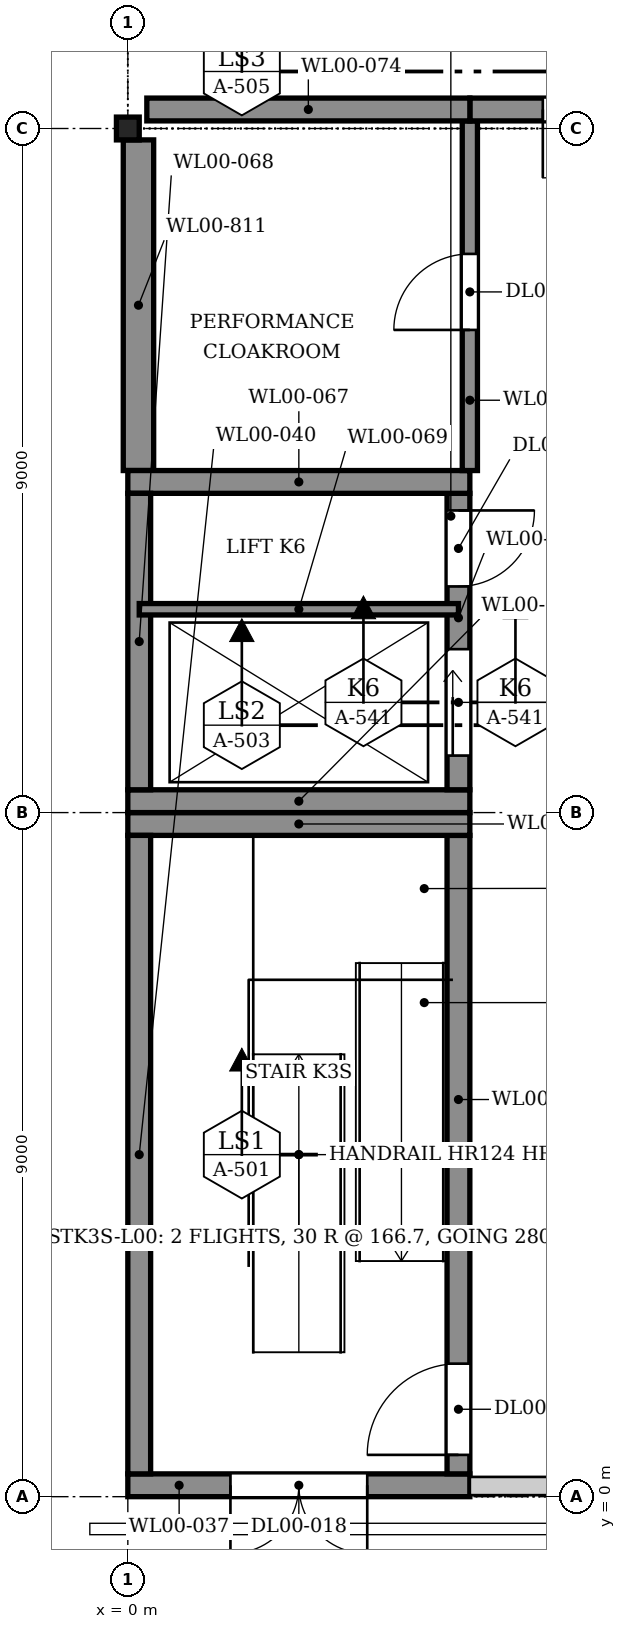
"""IFC4 building model, lengths in metres.
Left out: names, types, materials, properties, quantities, classifications, styles, units other than length and angle.
Written with IfcOpenShell. Run it as: python <this file> out.ifc"""

import sys

from ifc_helpers import new_model, si_unit, direction, frame, frame_2d, origin, origin_2d, place, context, subcontext, project, spatial, polyline, rectangle, hollow_rectangle, outline, extrude, element, fill, save


model = new_model("IFC4")
c1 = context("Model", 3, precision=1e-05, world=origin(), true_north=direction((0.0, 1.0)))
c2 = subcontext(c1, "Body", "Model", "MODEL_VIEW")
j1 = project(units=[si_unit("LENGTHUNIT", "METRE"), si_unit("PLANEANGLEUNIT", "RADIAN")], contexts=[c1])
p1 = place(None, origin())
s1 = spatial("IfcSite", under=j1, at=p1, CompositionType="ELEMENT")
p2 = place(p1, origin())
s2 = spatial("IfcBuilding", under=s1, at=p2, CompositionType="ELEMENT")
p3 = place(p2, origin())
s3 = spatial("IfcBuildingStorey", under=s2, at=p3, CompositionType="ELEMENT", Elevation=0.0)
p4 = place(p3, frame((0.0, 18.0, 0.0), z_axis=(0.0, 0.0, 1.0), x_axis=(1.0, 0.0, 0.0)))
e1 = element("IfcColumn", 1, at=p4, inside=s3, PredefinedType="COLUMN", context=c2, shape_type="SweptSolid", body=[
    extrude(hollow_rectangle(XDim=0.3, YDim=0.3, WallThickness=0.016, InnerFilletRadius=0.024, OuterFilletRadius=0.04, at=origin_2d()), origin(), (0.0, 0.0, 1.0), 5.0),
])
p5 = place(p3, frame((0.14, 18.15, 0.0), z_axis=(0.0, 0.0, 1.0), x_axis=(0.0, 1.0, 0.0)))
e2 = element("IfcWall", 2, at=p5, inside=s3, PredefinedType="SOLIDWALL", context=c2, shape_type="SweptSolid", body=[
    extrude(outline(polyline([(0.0, 0.0), (8.85, 0.0), (8.85, 15.44), (0.0, 14.732), (0.0, 0.0)])), frame((0.0, 0.2, 0.0), z_axis=(0.0, -1.0, 0.0), x_axis=(1.0, 0.0, 0.0)), (0.0, 0.0, 1.0), 0.4),
])
p6 = place(p3, frame((0.14, 13.5, 0.0), z_axis=(0.0, 0.0, 1.0), x_axis=(0.0, 1.0, 0.0)))
e3 = element("IfcWall", 3, at=p6, inside=s3, PredefinedType="SOLIDWALL", context=c2, shape_type="SweptSolid", body=[
    extrude(rectangle(XDim=4.35, YDim=0.4, at=frame_2d((2.175, 0.0))), origin(), (0.0, 0.0, 1.0), 4.835),
])
p7 = place(p3, frame((0.0, 0.15, 0.0), z_axis=(0.0, 0.0, 1.0), x_axis=(1.0, 0.0, 0.0)))
e4 = element("IfcWall", 4, at=p7, inside=s3, PredefinedType="SOLIDWALL", context=c2, shape_type="SweptSolid", body=[
    extrude(rectangle(XDim=4.5, YDim=0.3, at=frame_2d((2.25, 0.0))), origin(), (0.0, 0.0, 1.0), 5.0),
])
p8 = place(p7, frame((1.35, 0.0, 0.0)))
e5 = element("IfcOpeningElement", 5, at=p8, cuts=e4, PredefinedType="OPENING", context=c2, shape_type="SweptSolid", body=[
    extrude(rectangle(XDim=1.8, YDim=2.1, at=frame_2d((0.9, 1.05))), frame((0.0, 0.16, 0.0), z_axis=(0.0, -1.0, 0.0), x_axis=(1.0, 0.0, 0.0)), (0.0, 0.0, 1.0), 0.32),
])
p9 = place(p3, frame((4.35, 0.3, 0.0), z_axis=(0.0, 0.0, 1.0), x_axis=(0.0, 1.0, 0.0)))
e6 = element("IfcWall", 6, at=p9, inside=s3, PredefinedType="SOLIDWALL", context=c2, shape_type="SweptSolid", body=[
    extrude(rectangle(XDim=8.4, YDim=0.3, at=frame_2d((4.2, 0.0))), origin(), (0.0, 0.0, 1.0), 5.0),
])
p10 = place(p9, frame((0.25, 0.0, 0.0)))
e7 = element("IfcOpeningElement", 7, at=p10, cuts=e6, PredefinedType="OPENING", context=c2, shape_type="SweptSolid", body=[
    extrude(rectangle(XDim=1.2, YDim=2.1, at=frame_2d((0.6, 1.05))), frame((0.0, 0.16, 0.0), z_axis=(0.0, -1.0, 0.0), x_axis=(1.0, 0.0, 0.0)), (0.0, 0.0, 1.0), 0.32),
])
p11 = place(p3, frame((0.0, 8.85, 0.0), z_axis=(0.0, 0.0, 1.0), x_axis=(1.0, 0.0, 0.0)))
e8 = element("IfcWall", 8, at=p11, inside=s3, PredefinedType="SOLIDWALL", context=c2, shape_type="SweptSolid", body=[
    extrude(rectangle(XDim=4.5, YDim=0.3, at=frame_2d((2.25, 0.0))), origin(), (0.0, 0.0, 1.0), 5.0),
])
p12 = place(p3, frame((0.15, 0.3, 0.0), z_axis=(0.0, 0.0, 1.0), x_axis=(0.0, 1.0, 0.0)))
e9 = element("IfcWall", 9, at=p12, inside=s3, PredefinedType="SOLIDWALL", context=c2, shape_type="SweptSolid", body=[
    extrude(rectangle(XDim=8.4, YDim=0.3, at=frame_2d((4.2, 0.0))), origin(), (0.0, 0.0, 1.0), 5.0),
])
p13 = place(p3, frame((0.0, 9.15, 0.0), z_axis=(0.0, 0.0, 1.0), x_axis=(1.0, 0.0, 0.0)))
e10 = element("IfcWall", 10, at=p13, inside=s3, PredefinedType="SOLIDWALL", context=c2, shape_type="SweptSolid", body=[
    extrude(rectangle(XDim=4.5, YDim=0.3, at=frame_2d((2.25, 0.0))), origin(), (0.0, 0.0, 1.0), 5.0),
])
p14 = place(p3, frame((4.35, 9.3, 0.0), z_axis=(0.0, 0.0, 1.0), x_axis=(0.0, 1.0, 0.0)))
e11 = element("IfcWall", 11, at=p14, inside=s3, PredefinedType="SOLIDWALL", context=c2, shape_type="SweptSolid", body=[
    extrude(rectangle(XDim=3.9, YDim=0.3, at=frame_2d((1.95, 0.0))), origin(), (0.0, 0.0, 1.0), 5.0),
])
p15 = place(p14, frame((0.45, 0.0, 0.0)))
e12 = element("IfcOpeningElement", 12, at=p15, cuts=e11, PredefinedType="OPENING", context=c2, shape_type="SweptSolid", body=[
    extrude(rectangle(XDim=1.4, YDim=2.1, at=frame_2d((0.7, 1.05))), frame((0.0, 0.16, 0.0), z_axis=(0.0, -1.0, 0.0), x_axis=(1.0, 0.0, 0.0)), (0.0, 0.0, 1.0), 0.32),
])
p16 = place(p14, frame((2.675, 0.0, 0.0)))
e13 = element("IfcOpeningElement", 13, at=p16, cuts=e11, PredefinedType="OPENING", context=c2, shape_type="SweptSolid", body=[
    extrude(rectangle(XDim=1.0, YDim=2.1, at=frame_2d((0.5, 1.05))), frame((0.0, 0.16, 0.0), z_axis=(0.0, -1.0, 0.0), x_axis=(1.0, 0.0, 0.0)), (0.0, 0.0, 1.0), 0.32),
])
p17 = place(p3, frame((0.0, 13.35, 0.0), z_axis=(0.0, 0.0, 1.0), x_axis=(1.0, 0.0, 0.0)))
e14 = element("IfcWall", 14, at=p17, inside=s3, PredefinedType="SOLIDWALL", context=c2, shape_type="SweptSolid", body=[
    extrude(rectangle(XDim=4.5, YDim=0.3, at=frame_2d((2.25, 0.0))), origin(), (0.0, 0.0, 1.0), 5.0),
])
p18 = place(p3, frame((0.15, 9.3, 0.0), z_axis=(0.0, 0.0, 1.0), x_axis=(0.0, 1.0, 0.0)))
e15 = element("IfcWall", 15, at=p18, inside=s3, PredefinedType="SOLIDWALL", context=c2, shape_type="SweptSolid", body=[
    extrude(rectangle(XDim=3.9, YDim=0.3, at=frame_2d((1.95, 0.0))), origin(), (0.0, 0.0, 1.0), 5.0),
])
p19 = place(p3, frame((0.15, 11.675, 0.0), z_axis=(0.0, 0.0, 1.0), x_axis=(1.0, 0.0, 0.0)))
e16 = element("IfcWall", 16, at=p19, inside=s3, PredefinedType="SOLIDWALL", context=c2, shape_type="SweptSolid", body=[
    extrude(rectangle(XDim=4.2, YDim=0.15, at=frame_2d((2.1, 0.0))), origin(), (0.0, 0.0, 1.0), 5.0),
])
p20 = place(p3, frame((4.5, 13.5, 0.0), z_axis=(0.0, 0.0, 1.0), x_axis=(0.0, 1.0, 0.0)))
e17 = element("IfcWall", 17, at=p20, inside=s3, PredefinedType="PARTITIONING", context=c2, shape_type="SweptSolid", body=[
    extrude(rectangle(XDim=4.6, YDim=0.2, at=frame_2d((2.3, 0.0))), origin(), (0.0, 0.0, 1.0), 3.825),
])
p21 = place(p20, frame((1.85, 0.0, 0.0)))
e18 = element("IfcOpeningElement", 18, at=p21, cuts=e17, PredefinedType="OPENING", context=c2, shape_type="SweptSolid", body=[
    extrude(rectangle(XDim=1.0, YDim=2.1, at=frame_2d((0.5, 1.05))), frame((0.0, 0.11, 0.0), z_axis=(0.0, -1.0, 0.0), x_axis=(1.0, 0.0, 0.0)), (0.0, 0.0, 1.0), 0.22),
])
p22 = place(p3, frame((4.5, 18.25, -0.038), z_axis=(0.0, 0.0, 1.0), x_axis=(1.0, 0.0, 0.0)))
e19 = element("IfcWall", 19, at=p22, inside=s3, PredefinedType="PARTITIONING", context=c2, shape_type="SweptSolid", body=[
    extrude(rectangle(XDim=7.5, YDim=0.3, at=frame_2d((3.75, 0.0))), origin(), (0.0, 0.0, 1.0), 12.428),
])
p23 = place(p22, frame((0.96, 0.0, 0.0)))
e20 = element("IfcOpeningElement", 20, at=p23, cuts=e19, PredefinedType="OPENING", context=c2, shape_type="SweptSolid", body=[
    extrude(rectangle(XDim=1.8, YDim=2.1, at=frame_2d((0.9, 1.05))), frame((0.0, 0.16, 0.0), z_axis=(0.0, -1.0, 0.0), x_axis=(1.0, 0.0, 0.0)), (0.0, 0.0, 1.0), 0.32),
])
p24 = place(p22, frame((4.76, 0.0, 0.0)))
e21 = element("IfcOpeningElement", 21, at=p24, cuts=e19, PredefinedType="OPENING", context=c2, shape_type="SweptSolid", body=[
    extrude(rectangle(XDim=1.8, YDim=2.1, at=frame_2d((0.9, 1.05))), frame((0.0, 0.16, 0.0), z_axis=(0.0, -1.0, 0.0), x_axis=(1.0, 0.0, 0.0)), (0.0, 0.0, 1.0), 0.32),
])
p25 = place(p3, frame((0.25, 18.25, -0.038), z_axis=(0.0, 0.0, 1.0), x_axis=(1.0, 0.0, 0.0)))
e22 = element("IfcWall", 22, at=p25, inside=s3, PredefinedType="PARTITIONING", context=c2, shape_type="SweptSolid", body=[
    extrude(rectangle(XDim=4.25, YDim=0.3, at=frame_2d((2.125, 0.0))), origin(), (0.0, 0.0, 1.0), 12.428),
])
p26 = place(p8, frame((1.8, 0.0, 0.0), z_axis=(0.0, 0.0, 1.0), x_axis=(-1.0, 0.0, 0.0)))
e23 = element("IfcDoor", 23, at=p26, inside=s3, OperationType="DOUBLE_DOOR_SINGLE_SWING", PredefinedType="DOOR", context=c2, shape_type="SweptSolid", body=[
    extrude(rectangle(XDim=1.8, YDim=2.1, at=frame_2d((0.9, 1.05))), frame((0.0, 0.025, 0.0), z_axis=(0.0, -1.0, 0.0), x_axis=(1.0, 0.0, 0.0)), (0.0, 0.0, 1.0), 0.05),
])
fill(e5, e23)
p27 = place(p10, origin())
e24 = element("IfcDoor", 24, at=p27, inside=s3, OperationType="SINGLE_SWING_RIGHT", PredefinedType="DOOR", context=c2, shape_type="SweptSolid", body=[
    extrude(rectangle(XDim=1.2, YDim=2.1, at=frame_2d((0.6, 1.05))), frame((0.0, 0.025, 0.0), z_axis=(0.0, -1.0, 0.0), x_axis=(1.0, 0.0, 0.0)), (0.0, 0.0, 1.0), 0.05),
])
fill(e7, e24)
p28 = place(p15, origin())
e25 = element("IfcDoor", 25, at=p28, inside=s3, OperationType="SLIDING_TO_LEFT", PredefinedType="DOOR", context=c2, shape_type="SweptSolid", body=[
    extrude(rectangle(XDim=1.4, YDim=2.1, at=frame_2d((0.7, 1.05))), frame((0.0, 0.025, 0.0), z_axis=(0.0, -1.0, 0.0), x_axis=(1.0, 0.0, 0.0)), (0.0, 0.0, 1.0), 0.05),
])
fill(e12, e25)
p29 = place(p16, frame((1.0, 0.0, 0.0), z_axis=(0.0, 0.0, 1.0), x_axis=(-1.0, 0.0, 0.0)))
e26 = element("IfcDoor", 26, at=p29, inside=s3, OperationType="SINGLE_SWING_RIGHT", PredefinedType="DOOR", context=c2, shape_type="SweptSolid", body=[
    extrude(rectangle(XDim=1.0, YDim=2.1, at=frame_2d((0.5, 1.05))), frame((0.0, 0.025, 0.0), z_axis=(0.0, -1.0, 0.0), x_axis=(1.0, 0.0, 0.0)), (0.0, 0.0, 1.0), 0.05),
])
fill(e13, e26)
p30 = place(p23, frame((1.8, 0.0, 0.0), z_axis=(0.0, 0.0, 1.0), x_axis=(-1.0, 0.0, 0.0)))
e27 = element("IfcDoor", 27, at=p30, inside=s3, OperationType="DOUBLE_DOOR_SINGLE_SWING", PredefinedType="DOOR", context=c2, shape_type="SweptSolid", body=[
    extrude(rectangle(XDim=1.8, YDim=2.1, at=frame_2d((0.9, 1.05))), frame((0.0, 0.025, 0.0), z_axis=(0.0, -1.0, 0.0), x_axis=(1.0, 0.0, 0.0)), (0.0, 0.0, 1.0), 0.05),
])
fill(e20, e27)
p31 = place(p21, origin())
e28 = element("IfcDoor", 28, at=p31, inside=s3, OperationType="SINGLE_SWING_RIGHT", PredefinedType="DOOR", context=c2, shape_type="SweptSolid", body=[
    extrude(rectangle(XDim=1.0, YDim=2.1, at=frame_2d((0.5, 1.05))), frame((0.0, 0.025, 0.0), z_axis=(0.0, -1.0, 0.0), x_axis=(1.0, 0.0, 0.0)), (0.0, 0.0, 1.0), 0.05),
])
fill(e18, e28)
save(model, sys.argv[1])
